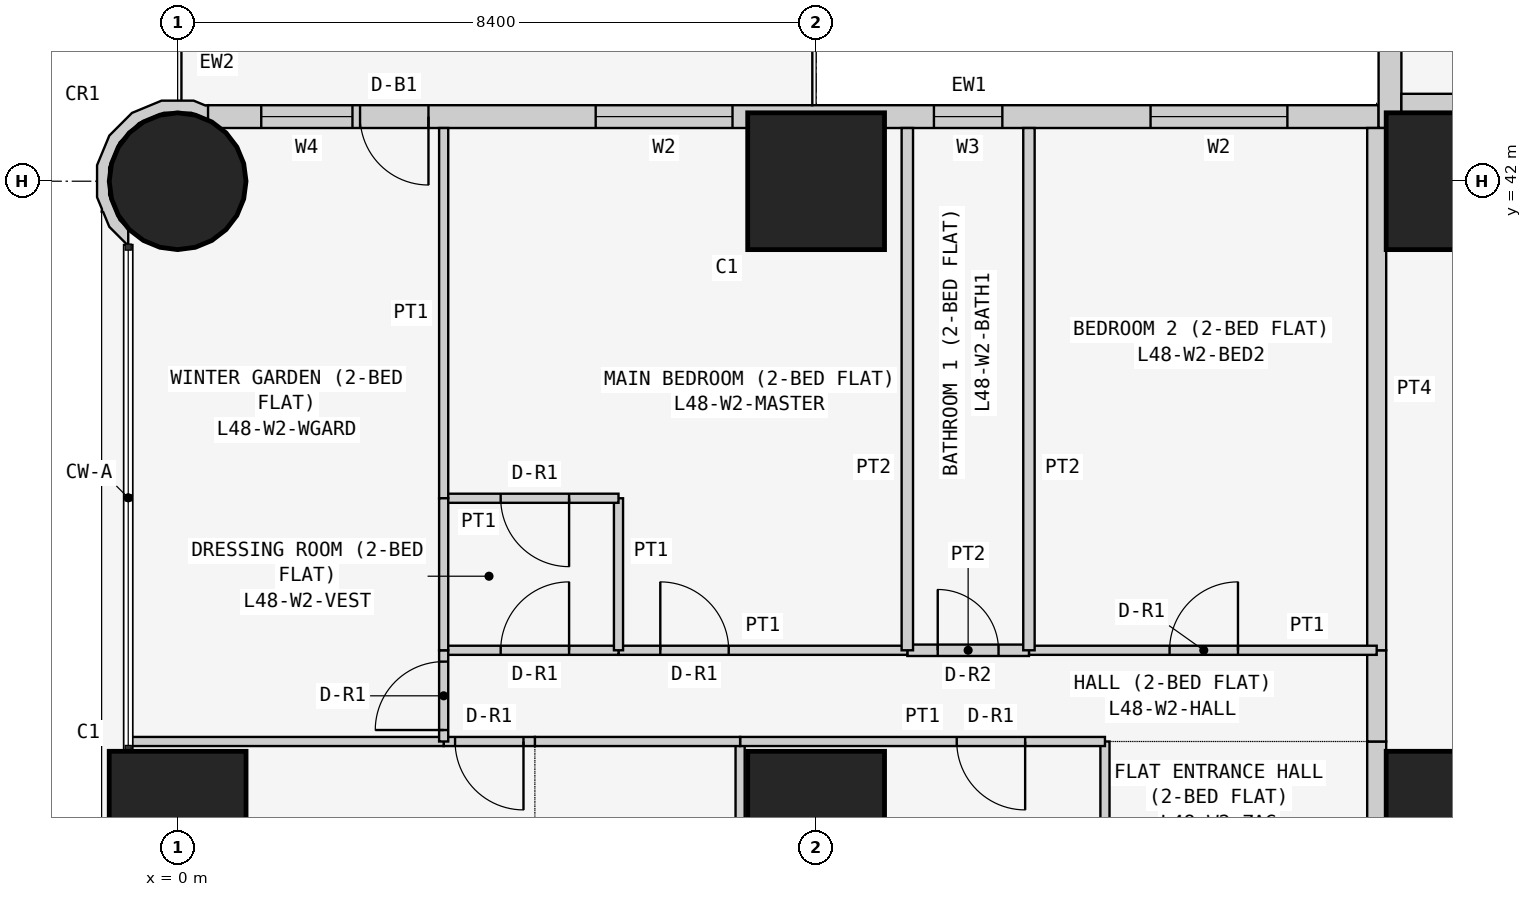
"""IFC4 building model, lengths in metres.
Left out: names, types, materials, properties, quantities, classifications, styles, units other than length and angle.
Written with IfcOpenShell. Run it as: python <this file> out.ifc"""

import sys

from ifc_helpers import new_model, si_unit, direction, frame, frame_2d, origin, origin_2d, place, context, subcontext, project, spatial, polyline, rectangle, circle, outline, extrude, element, fill, save


model = new_model("IFC4")
c1 = context("Model", 3, precision=1e-05, world=origin(), true_north=direction((0.0, 1.0)))
c2 = subcontext(c1, "Body", "Model", "MODEL_VIEW")
j1 = project(units=[si_unit("LENGTHUNIT", "METRE"), si_unit("PLANEANGLEUNIT", "RADIAN")], contexts=[c1])
p1 = place(None, origin())
s1 = spatial("IfcSite", under=j1, at=p1, CompositionType="ELEMENT")
p2 = place(p1, origin())
s2 = spatial("IfcBuilding", under=s1, at=p2, CompositionType="ELEMENT")
p3 = place(p2, frame((0.0, 0.0, 186.9)))
s3 = spatial("IfcBuildingStorey", under=s2, at=p3, CompositionType="ELEMENT", Elevation=186.9)
p4 = place(p3, frame((0.0, 33.6, 0.0), z_axis=(0.0, 0.0, 1.0), x_axis=(1.0, 0.0, 0.0)))
e1 = element("IfcColumn", 1, at=p4, inside=s3, PredefinedType="COLUMN", context=c2, shape_type="SweptSolid", body=[
    extrude(rectangle(XDim=1.8, YDim=1.8, at=origin_2d()), origin(), (0.0, 0.0, 1.0), 3.6),
])
p5 = place(p3, frame((0.0, 42.0, 0.0), z_axis=(0.0, 0.0, 1.0), x_axis=(1.0, 0.0, 0.0)))
e2 = element("IfcColumn", 2, at=p5, inside=s3, PredefinedType="COLUMN", context=c2, shape_type="SweptSolid", body=[
    extrude(circle(Radius=0.9, at=origin_2d()), origin(), (0.0, 0.0, 1.0), 3.6),
])
for number, where, z_axis, x_axis in (
    (3, (8.4, 33.6, 0.0), (0.0, 0.0, 1.0), (1.0, 0.0, 0.0)),
    (4, (8.4, 42.0, 0.0), (0.0, 0.0, 1.0), (1.0, 0.0, 0.0)),
    (5, (16.8, 33.6, 0.0), (0.0, 0.0, 1.0), (1.0, 0.0, 0.0)),
    (6, (16.8, 42.0, 0.0), (0.0, 0.0, 1.0), (1.0, 0.0, 0.0)),
):
    element("IfcColumn", number, at=place(p3, frame(where, z_axis=z_axis, x_axis=x_axis)), inside=s3, PredefinedType="COLUMN", context=c2, shape_type="SweptSolid", body=[
        extrude(rectangle(XDim=1.8, YDim=1.8, at=origin_2d()), origin(), (0.0, 0.0, 1.0), 3.6),
    ])
p6 = place(p3, frame((15.8, 42.85, 0.0), z_axis=(0.0, 0.0, 1.0), x_axis=(-1.0, 0.0, 0.0)))
e7 = element("IfcWall", 7, at=p6, inside=s3, PredefinedType="SOLIDWALL", context=c2, shape_type="SweptSolid", body=[
    extrude(rectangle(XDim=15.4, YDim=0.3, at=frame_2d((7.7, 0.0))), origin(), (0.0, 0.0, 1.0), 3.45),
])
p7 = place(p6, frame((1.2, 0.0, 0.9)))
e8 = element("IfcOpeningElement", 8, at=p7, cuts=e7, PredefinedType="OPENING", context=c2, shape_type="SweptSolid", body=[
    extrude(rectangle(XDim=1.8, YDim=1.5, at=frame_2d((0.9, 0.75))), frame((0.0, 0.16, 0.0), z_axis=(0.0, -1.0, 0.0), x_axis=(1.0, 0.0, 0.0)), (0.0, 0.0, 1.0), 0.32),
])
p8 = place(p6, frame((4.95, 0.0, 1.5)))
e9 = element("IfcOpeningElement", 9, at=p8, cuts=e7, PredefinedType="OPENING", context=c2, shape_type="SweptSolid", body=[
    extrude(rectangle(XDim=0.9, YDim=0.7, at=frame_2d((0.45, 0.35))), frame((0.0, 0.16, 0.0), z_axis=(0.0, -1.0, 0.0), x_axis=(1.0, 0.0, 0.0)), (0.0, 0.0, 1.0), 0.32),
])
p9 = place(p6, frame((8.5, 0.0, 0.9)))
e10 = element("IfcOpeningElement", 10, at=p9, cuts=e7, PredefinedType="OPENING", context=c2, shape_type="SweptSolid", body=[
    extrude(rectangle(XDim=1.8, YDim=1.5, at=frame_2d((0.9, 0.75))), frame((0.0, 0.16, 0.0), z_axis=(0.0, -1.0, 0.0), x_axis=(1.0, 0.0, 0.0)), (0.0, 0.0, 1.0), 0.32),
])
p10 = place(p6, frame((12.5, 0.0, 0.0)))
e11 = element("IfcOpeningElement", 11, at=p10, cuts=e7, PredefinedType="OPENING", context=c2, shape_type="SweptSolid", body=[
    extrude(rectangle(XDim=0.9, YDim=2.4, at=frame_2d((0.45, 1.2))), frame((0.0, 0.16, 0.0), z_axis=(0.0, -1.0, 0.0), x_axis=(1.0, 0.0, 0.0)), (0.0, 0.0, 1.0), 0.32),
])
p11 = place(p6, frame((13.5, 0.0, 0.9)))
e12 = element("IfcOpeningElement", 12, at=p11, cuts=e7, PredefinedType="OPENING", context=c2, shape_type="SweptSolid", body=[
    extrude(rectangle(XDim=1.2, YDim=1.5, at=frame_2d((0.6, 0.75))), frame((0.0, 0.16, 0.0), z_axis=(0.0, -1.0, 0.0), x_axis=(1.0, 0.0, 0.0)), (0.0, 0.0, 1.0), 0.32),
])
p12 = place(p3, frame((15.95, 50.0, 0.0), z_axis=(0.0, 0.0, 1.0), x_axis=(0.0, -1.0, 0.0)))
e13 = element("IfcWall", 13, at=p12, inside=s3, PredefinedType="SOLIDWALL", context=c2, shape_type="SweptSolid", body=[
    extrude(rectangle(XDim=7.3, YDim=0.3, at=frame_2d((3.65, 0.0))), origin(), (0.0, 0.0, 1.0), 3.45),
])
p13 = place(p12, frame((3.1, 0.0, 0.9)))
e14 = element("IfcOpeningElement", 14, at=p13, cuts=e13, PredefinedType="OPENING", context=c2, shape_type="SweptSolid", body=[
    extrude(rectangle(XDim=2.4, YDim=1.5, at=frame_2d((1.2, 0.75))), frame((0.0, 0.16, 0.0), z_axis=(0.0, -1.0, 0.0), x_axis=(1.0, 0.0, 0.0)), (0.0, 0.0, 1.0), 0.32),
])
p14 = place(p12, frame((0.75, 0.0, 0.9)))
e15 = element("IfcOpeningElement", 15, at=p14, cuts=e13, PredefinedType="OPENING", context=c2, shape_type="SweptSolid", body=[
    extrude(rectangle(XDim=1.2, YDim=1.5, at=frame_2d((0.6, 0.75))), frame((0.0, 0.16, 0.0), z_axis=(0.0, -1.0, 0.0), x_axis=(1.0, 0.0, 0.0)), (0.0, 0.0, 1.0), 0.32),
])
p15 = place(p3, frame((0.364, 42.91, 0.0), z_axis=(0.0, 0.0, 1.0), x_axis=(-0.926129809145, 0.377204953059, 0.0)))
e16 = element("IfcWall", 16, at=p15, inside=s3, PredefinedType="SOLIDWALL", context=c2, shape_type="SweptSolid", body=[
    extrude(outline(polyline([(0.36, 1.803), (0.509, 1.741), (0.761, 1.486), (0.896, 1.154), (0.894, 0.795), (0.755, 0.465), (0.5, 0.213), (0.168, 0.078), (-0.1, 0.08), (0.001, -0.097), (0.03, -0.08), (0.199, -0.081), (0.589, 0.078), (0.889, 0.374), (1.053, 0.763), (1.055, 1.185), (0.896, 1.575), (0.778, 1.695), (0.769, 1.728), (0.75, 1.723), (0.6, 1.875), (0.295, 2.003), (0.281, 1.998), (0.36, 1.803)])), origin(), (0.0, 0.0, 1.0), 3.45),
])
p16 = place(p3, frame((16.1, 43.025, 0.0), z_axis=(0.0, 0.0, 1.0), x_axis=(1.0, 0.0, 0.0)))
e17 = element("IfcWall", 17, at=p16, inside=s3, PredefinedType="PARTITIONING", context=c2, shape_type="SweptSolid", body=[
    extrude(rectangle(XDim=6.471, YDim=0.25, at=frame_2d((3.235, 0.0))), origin(), (0.0, 0.0, 1.0), 3.45),
])
p17 = place(p3, frame((15.775, 29.4, 0.0), z_axis=(0.0, 0.0, 1.0), x_axis=(0.0, 1.0, 0.0)))
e18 = element("IfcWall", 18, at=p17, inside=s3, PredefinedType="PARTITIONING", context=c2, shape_type="SweptSolid", body=[
    extrude(rectangle(XDim=5.229, YDim=0.25, at=frame_2d((2.615, 0.0))), origin(), (0.0, 0.0, 1.0), 3.45),
])
p18 = place(p17, frame((2.1, 0.0, 0.0)))
e19 = element("IfcOpeningElement", 19, at=p18, cuts=e18, PredefinedType="OPENING", context=c2, shape_type="SweptSolid", body=[
    extrude(rectangle(XDim=1.0, YDim=2.1, at=frame_2d((0.5, 1.05))), frame((0.0, 0.135, 0.0), z_axis=(0.0, -1.0, 0.0), x_axis=(1.0, 0.0, 0.0)), (0.0, 0.0, 1.0), 0.27),
])
p19 = place(p3, frame((15.775, 34.629, 0.0), z_axis=(0.0, 0.0, 1.0), x_axis=(0.0, 1.0, 0.0)))
e20 = element("IfcWall", 20, at=p19, inside=s3, PredefinedType="PARTITIONING", context=c2, shape_type="SweptSolid", body=[
    extrude(rectangle(XDim=1.2, YDim=0.25, at=frame_2d((0.6, 0.0))), origin(), (0.0, 0.0, 1.0), 3.45),
])
p20 = place(p3, frame((15.775, 35.829, 0.0), z_axis=(0.0, 0.0, 1.0), x_axis=(0.0, 1.0, 0.0)))
e21 = element("IfcWall", 21, at=p20, inside=s3, PredefinedType="PARTITIONING", context=c2, shape_type="SweptSolid", body=[
    extrude(rectangle(XDim=6.871, YDim=0.25, at=frame_2d((3.436, 0.0))), origin(), (0.0, 0.0, 1.0), 3.45),
])
for number, where, z_axis, x_axis in (
    (22, (12.2, 29.4, 0.0), (0.0, 0.0, 1.0), (0.0, 1.0, 0.0)),
    (23, (7.4, 29.4, 0.0), (0.0, 0.0, 1.0), (0.0, 1.0, 0.0)),
):
    element("IfcWall", number, at=place(p3, frame(where, z_axis=z_axis, x_axis=x_axis)), inside=s3, PredefinedType="PARTITIONING", context=c2, shape_type="SweptSolid", body=[
        extrude(rectangle(XDim=5.229, YDim=0.12, at=frame_2d((2.615, 0.0))), origin(), (0.0, 0.0, 1.0), 3.45),
    ])
p21 = place(p3, frame((7.4, 34.629, 0.0), z_axis=(0.0, 0.0, 1.0), x_axis=(1.0, 0.0, 0.0)))
e24 = element("IfcWall", 24, at=p21, inside=s3, PredefinedType="PARTITIONING", context=c2, shape_type="SweptSolid", body=[
    extrude(rectangle(XDim=4.8, YDim=0.12, at=frame_2d((2.4, 0.0))), origin(), (0.0, 0.0, 1.0), 3.45),
])
p22 = place(p21, frame((2.85, 0.0, 0.0)))
e25 = element("IfcOpeningElement", 25, at=p22, cuts=e24, PredefinedType="OPENING", context=c2, shape_type="SweptSolid", body=[
    extrude(rectangle(XDim=0.9, YDim=2.1, at=frame_2d((0.45, 1.05))), frame((0.0, 0.07, 0.0), z_axis=(0.0, -1.0, 0.0), x_axis=(1.0, 0.0, 0.0)), (0.0, 0.0, 1.0), 0.14),
])
p23 = place(p3, frame((4.7, 34.629, 0.0), z_axis=(0.0, 0.0, 1.0), x_axis=(1.0, 0.0, 0.0)))
e26 = element("IfcWall", 26, at=p23, inside=s3, PredefinedType="PARTITIONING", context=c2, shape_type="SweptSolid", body=[
    extrude(rectangle(XDim=2.7, YDim=0.12, at=frame_2d((1.35, 0.0))), origin(), (0.0, 0.0, 1.0), 3.45),
])
p24 = place(p3, frame((3.5, 34.629, 0.0), z_axis=(0.0, 0.0, 1.0), x_axis=(1.0, 0.0, 0.0)))
e27 = element("IfcWall", 27, at=p24, inside=s3, PredefinedType="PARTITIONING", context=c2, shape_type="SweptSolid", body=[
    extrude(rectangle(XDim=1.2, YDim=0.12, at=frame_2d((0.6, 0.0))), origin(), (0.0, 0.0, 1.0), 3.45),
])
p25 = place(p24, frame((0.15, 0.0, 0.0)))
e28 = element("IfcOpeningElement", 28, at=p25, cuts=e27, PredefinedType="OPENING", context=c2, shape_type="SweptSolid", body=[
    extrude(rectangle(XDim=0.9, YDim=2.1, at=frame_2d((0.45, 1.05))), frame((0.0, 0.07, 0.0), z_axis=(0.0, -1.0, 0.0), x_axis=(1.0, 0.0, 0.0)), (0.0, 0.0, 1.0), 0.14),
])
p26 = place(p3, frame((-0.65, 34.629, 0.0), z_axis=(0.0, 0.0, 1.0), x_axis=(1.0, 0.0, 0.0)))
e29 = element("IfcWall", 29, at=p26, inside=s3, PredefinedType="PARTITIONING", context=c2, shape_type="SweptSolid", body=[
    extrude(rectangle(XDim=4.15, YDim=0.12, at=frame_2d((2.075, 0.0))), origin(), (0.0, 0.0, 1.0), 3.45),
])
p27 = place(p3, frame((11.2, 35.829, 0.0), z_axis=(0.0, 0.0, 1.0), x_axis=(1.0, 0.0, 0.0)))
e30 = element("IfcWall", 30, at=p27, inside=s3, PredefinedType="PARTITIONING", context=c2, shape_type="SweptSolid", body=[
    extrude(rectangle(XDim=4.575, YDim=0.12, at=frame_2d((2.288, 0.0))), origin(), (0.0, 0.0, 1.0), 3.45),
])
p28 = place(p27, frame((1.85, 0.0, 0.0)))
e31 = element("IfcOpeningElement", 31, at=p28, cuts=e30, PredefinedType="OPENING", context=c2, shape_type="SweptSolid", body=[
    extrude(rectangle(XDim=0.9, YDim=2.1, at=frame_2d((0.45, 1.05))), frame((0.0, 0.07, 0.0), z_axis=(0.0, -1.0, 0.0), x_axis=(1.0, 0.0, 0.0)), (0.0, 0.0, 1.0), 0.14),
])
p29 = place(p3, frame((9.6, 35.829, 0.0), z_axis=(0.0, 0.0, 1.0), x_axis=(1.0, 0.0, 0.0)))
e32 = element("IfcWall", 32, at=p29, inside=s3, PredefinedType="PARTITIONING", context=c2, shape_type="SweptSolid", body=[
    extrude(rectangle(XDim=1.6, YDim=0.15, at=frame_2d((0.8, 0.0))), origin(), (0.0, 0.0, 1.0), 3.45),
])
p30 = place(p29, frame((0.4, 0.0, 0.0)))
e33 = element("IfcOpeningElement", 33, at=p30, cuts=e32, PredefinedType="OPENING", context=c2, shape_type="SweptSolid", body=[
    extrude(rectangle(XDim=0.8, YDim=2.1, at=frame_2d((0.4, 1.05))), frame((0.0, 0.085, 0.0), z_axis=(0.0, -1.0, 0.0), x_axis=(1.0, 0.0, 0.0)), (0.0, 0.0, 1.0), 0.17),
])
p31 = place(p3, frame((5.8, 35.829, 0.0), z_axis=(0.0, 0.0, 1.0), x_axis=(1.0, 0.0, 0.0)))
e34 = element("IfcWall", 34, at=p31, inside=s3, PredefinedType="PARTITIONING", context=c2, shape_type="SweptSolid", body=[
    extrude(rectangle(XDim=3.8, YDim=0.12, at=frame_2d((1.9, 0.0))), origin(), (0.0, 0.0, 1.0), 3.45),
])
p32 = place(p31, frame((0.55, 0.0, 0.0)))
e35 = element("IfcOpeningElement", 35, at=p32, cuts=e34, PredefinedType="OPENING", context=c2, shape_type="SweptSolid", body=[
    extrude(rectangle(XDim=0.9, YDim=2.1, at=frame_2d((0.45, 1.05))), frame((0.0, 0.07, 0.0), z_axis=(0.0, -1.0, 0.0), x_axis=(1.0, 0.0, 0.0)), (0.0, 0.0, 1.0), 0.14),
])
p33 = place(p3, frame((3.5, 35.829, 0.0), z_axis=(0.0, 0.0, 1.0), x_axis=(1.0, 0.0, 0.0)))
e36 = element("IfcWall", 36, at=p33, inside=s3, PredefinedType="PARTITIONING", context=c2, shape_type="SweptSolid", body=[
    extrude(rectangle(XDim=2.3, YDim=0.12, at=frame_2d((1.15, 0.0))), origin(), (0.0, 0.0, 1.0), 3.45),
])
p34 = place(p33, frame((0.75, 0.0, 0.0)))
e37 = element("IfcOpeningElement", 37, at=p34, cuts=e36, PredefinedType="OPENING", context=c2, shape_type="SweptSolid", body=[
    extrude(rectangle(XDim=0.9, YDim=2.1, at=frame_2d((0.45, 1.05))), frame((0.0, 0.07, 0.0), z_axis=(0.0, -1.0, 0.0), x_axis=(1.0, 0.0, 0.0)), (0.0, 0.0, 1.0), 0.14),
])
p35 = place(p3, frame((3.5, 34.629, 0.0), z_axis=(0.0, 0.0, 1.0), x_axis=(0.0, 1.0, 0.0)))
e38 = element("IfcWall", 38, at=p35, inside=s3, PredefinedType="PARTITIONING", context=c2, shape_type="SweptSolid", body=[
    extrude(rectangle(XDim=1.2, YDim=0.12, at=frame_2d((0.6, 0.0))), origin(), (0.0, 0.0, 1.0), 3.45),
])
p36 = place(p35, frame((0.151, 0.0, 0.0)))
e39 = element("IfcOpeningElement", 39, at=p36, cuts=e38, PredefinedType="OPENING", context=c2, shape_type="SweptSolid", body=[
    extrude(rectangle(XDim=0.9, YDim=2.1, at=frame_2d((0.45, 1.05))), frame((0.0, 0.07, 0.0), z_axis=(0.0, -1.0, 0.0), x_axis=(1.0, 0.0, 0.0)), (0.0, 0.0, 1.0), 0.14),
])
for number, where, z_axis, x_axis in (
    (40, (11.2, 35.829, 0.0), (0.0, 0.0, 1.0), (0.0, 1.0, 0.0)),
    (41, (9.6, 35.829, 0.0), (0.0, 0.0, 1.0), (0.0, 1.0, 0.0)),
):
    element("IfcWall", number, at=place(p3, frame(where, z_axis=z_axis, x_axis=x_axis)), inside=s3, PredefinedType="PARTITIONING", context=c2, shape_type="SweptSolid", body=[
        extrude(rectangle(XDim=6.871, YDim=0.15, at=frame_2d((3.436, 0.0))), origin(), (0.0, 0.0, 1.0), 3.45),
    ])
p37 = place(p3, frame((5.8, 35.829, 0.0), z_axis=(0.0, 0.0, 1.0), x_axis=(0.0, 1.0, 0.0)))
e42 = element("IfcWall", 42, at=p37, inside=s3, PredefinedType="PARTITIONING", context=c2, shape_type="SweptSolid", body=[
    extrude(rectangle(XDim=2.0, YDim=0.12, at=frame_2d((1.0, 0.0))), origin(), (0.0, 0.0, 1.0), 3.45),
])
p38 = place(p3, frame((5.8, 37.829, 0.0), z_axis=(0.0, 0.0, 1.0), x_axis=(-1.0, 0.0, 0.0)))
e43 = element("IfcWall", 43, at=p38, inside=s3, PredefinedType="PARTITIONING", context=c2, shape_type="SweptSolid", body=[
    extrude(rectangle(XDim=2.3, YDim=0.12, at=frame_2d((1.15, 0.0))), origin(), (0.0, 0.0, 1.0), 3.45),
])
p39 = place(p38, frame((0.65, 0.0, 0.0)))
e44 = element("IfcOpeningElement", 44, at=p39, cuts=e43, PredefinedType="OPENING", context=c2, shape_type="SweptSolid", body=[
    extrude(rectangle(XDim=0.9, YDim=2.1, at=frame_2d((0.45, 1.05))), frame((0.0, 0.07, 0.0), z_axis=(0.0, -1.0, 0.0), x_axis=(1.0, 0.0, 0.0)), (0.0, 0.0, 1.0), 0.14),
])
p40 = place(p3, frame((3.5, 37.829, 0.0), z_axis=(0.0, 0.0, 1.0), x_axis=(0.0, 1.0, 0.0)))
e45 = element("IfcWall", 45, at=p40, inside=s3, PredefinedType="PARTITIONING", context=c2, shape_type="SweptSolid", body=[
    extrude(rectangle(XDim=4.871, YDim=0.12, at=frame_2d((2.436, 0.0))), origin(), (0.0, 0.0, 1.0), 3.45),
])
p41 = place(p3, frame((3.5, 35.829, 0.0), z_axis=(0.0, 0.0, 1.0), x_axis=(0.0, 1.0, 0.0)))
e46 = element("IfcWall", 46, at=p41, inside=s3, PredefinedType="PARTITIONING", context=c2, shape_type="SweptSolid", body=[
    extrude(rectangle(XDim=2.0, YDim=0.12, at=frame_2d((1.0, 0.0))), origin(), (0.0, 0.0, 1.0), 3.45),
])
p42 = place(p7, origin())
e47 = element("IfcWindow", 47, at=p42, inside=s3, PartitioningType="SINGLE_PANEL", PredefinedType="WINDOW", context=c2, shape_type="SweptSolid", body=[
    extrude(rectangle(XDim=1.8, YDim=1.5, at=frame_2d((0.9, 0.75))), frame((0.0, 0.03, 0.0), z_axis=(0.0, -1.0, 0.0), x_axis=(1.0, 0.0, 0.0)), (0.0, 0.0, 1.0), 0.06),
])
fill(e8, e47)
p43 = place(p8, origin())
e48 = element("IfcWindow", 48, at=p43, inside=s3, PartitioningType="SINGLE_PANEL", PredefinedType="WINDOW", context=c2, shape_type="SweptSolid", body=[
    extrude(rectangle(XDim=0.9, YDim=0.7, at=frame_2d((0.45, 0.35))), frame((0.0, 0.03, 0.0), z_axis=(0.0, -1.0, 0.0), x_axis=(1.0, 0.0, 0.0)), (0.0, 0.0, 1.0), 0.06),
])
fill(e9, e48)
p44 = place(p9, origin())
e49 = element("IfcWindow", 49, at=p44, inside=s3, PartitioningType="SINGLE_PANEL", PredefinedType="WINDOW", context=c2, shape_type="SweptSolid", body=[
    extrude(rectangle(XDim=1.8, YDim=1.5, at=frame_2d((0.9, 0.75))), frame((0.0, 0.03, 0.0), z_axis=(0.0, -1.0, 0.0), x_axis=(1.0, 0.0, 0.0)), (0.0, 0.0, 1.0), 0.06),
])
fill(e10, e49)
p45 = place(p10, origin())
e50 = element("IfcDoor", 50, at=p45, inside=s3, OperationType="SINGLE_SWING_LEFT", PredefinedType="DOOR", context=c2, shape_type="SweptSolid", body=[
    extrude(rectangle(XDim=0.9, YDim=2.4, at=frame_2d((0.45, 1.2))), frame((0.0, 0.025, 0.0), z_axis=(0.0, -1.0, 0.0), x_axis=(1.0, 0.0, 0.0)), (0.0, 0.0, 1.0), 0.05),
])
fill(e11, e50)
p46 = place(p11, origin())
e51 = element("IfcWindow", 51, at=p46, inside=s3, PartitioningType="SINGLE_PANEL", PredefinedType="WINDOW", context=c2, shape_type="SweptSolid", body=[
    extrude(rectangle(XDim=1.2, YDim=1.5, at=frame_2d((0.6, 0.75))), frame((0.0, 0.03, 0.0), z_axis=(0.0, -1.0, 0.0), x_axis=(1.0, 0.0, 0.0)), (0.0, 0.0, 1.0), 0.06),
])
fill(e12, e51)
p47 = place(p22, frame((0.9, 0.0, 0.0), z_axis=(0.0, 0.0, 1.0), x_axis=(-1.0, 0.0, 0.0)))
e52 = element("IfcDoor", 52, at=p47, inside=s3, OperationType="SINGLE_SWING_LEFT", PredefinedType="DOOR", context=c2, shape_type="SweptSolid", body=[
    extrude(rectangle(XDim=0.9, YDim=2.1, at=frame_2d((0.45, 1.05))), frame((0.0, 0.025, 0.0), z_axis=(0.0, -1.0, 0.0), x_axis=(1.0, 0.0, 0.0)), (0.0, 0.0, 1.0), 0.05),
])
fill(e25, e52)
p48 = place(p25, frame((0.9, 0.0, 0.0), z_axis=(0.0, 0.0, 1.0), x_axis=(-1.0, 0.0, 0.0)))
e53 = element("IfcDoor", 53, at=p48, inside=s3, OperationType="SINGLE_SWING_LEFT", PredefinedType="DOOR", context=c2, shape_type="SweptSolid", body=[
    extrude(rectangle(XDim=0.9, YDim=2.1, at=frame_2d((0.45, 1.05))), frame((0.0, 0.025, 0.0), z_axis=(0.0, -1.0, 0.0), x_axis=(1.0, 0.0, 0.0)), (0.0, 0.0, 1.0), 0.05),
])
fill(e28, e53)
p49 = place(p28, origin())
e54 = element("IfcDoor", 54, at=p49, inside=s3, OperationType="SINGLE_SWING_RIGHT", PredefinedType="DOOR", context=c2, shape_type="SweptSolid", body=[
    extrude(rectangle(XDim=0.9, YDim=2.1, at=frame_2d((0.45, 1.05))), frame((0.0, 0.025, 0.0), z_axis=(0.0, -1.0, 0.0), x_axis=(1.0, 0.0, 0.0)), (0.0, 0.0, 1.0), 0.05),
])
fill(e31, e54)
p50 = place(p30, origin())
e55 = element("IfcDoor", 55, at=p50, inside=s3, OperationType="SINGLE_SWING_LEFT", PredefinedType="DOOR", context=c2, shape_type="SweptSolid", body=[
    extrude(rectangle(XDim=0.8, YDim=2.1, at=frame_2d((0.4, 1.05))), frame((0.0, 0.025, 0.0), z_axis=(0.0, -1.0, 0.0), x_axis=(1.0, 0.0, 0.0)), (0.0, 0.0, 1.0), 0.05),
])
fill(e33, e55)
p51 = place(p32, origin())
e56 = element("IfcDoor", 56, at=p51, inside=s3, OperationType="SINGLE_SWING_LEFT", PredefinedType="DOOR", context=c2, shape_type="SweptSolid", body=[
    extrude(rectangle(XDim=0.9, YDim=2.1, at=frame_2d((0.45, 1.05))), frame((0.0, 0.025, 0.0), z_axis=(0.0, -1.0, 0.0), x_axis=(1.0, 0.0, 0.0)), (0.0, 0.0, 1.0), 0.05),
])
fill(e35, e56)
p52 = place(p34, origin())
e57 = element("IfcDoor", 57, at=p52, inside=s3, OperationType="SINGLE_SWING_RIGHT", PredefinedType="DOOR", context=c2, shape_type="SweptSolid", body=[
    extrude(rectangle(XDim=0.9, YDim=2.1, at=frame_2d((0.45, 1.05))), frame((0.0, 0.025, 0.0), z_axis=(0.0, -1.0, 0.0), x_axis=(1.0, 0.0, 0.0)), (0.0, 0.0, 1.0), 0.05),
])
fill(e37, e57)
p53 = place(p39, origin())
e58 = element("IfcDoor", 58, at=p53, inside=s3, OperationType="SINGLE_SWING_LEFT", PredefinedType="DOOR", context=c2, shape_type="SweptSolid", body=[
    extrude(rectangle(XDim=0.9, YDim=2.1, at=frame_2d((0.45, 1.05))), frame((0.0, 0.025, 0.0), z_axis=(0.0, -1.0, 0.0), x_axis=(1.0, 0.0, 0.0)), (0.0, 0.0, 1.0), 0.05),
])
fill(e44, e58)
p54 = place(p36, origin())
e59 = element("IfcDoor", 59, at=p54, inside=s3, OperationType="SINGLE_SWING_LEFT", PredefinedType="DOOR", context=c2, shape_type="SweptSolid", body=[
    extrude(rectangle(XDim=0.9, YDim=2.1, at=frame_2d((0.45, 1.05))), frame((0.0, 0.025, 0.0), z_axis=(0.0, -1.0, 0.0), x_axis=(1.0, 0.0, 0.0)), (0.0, 0.0, 1.0), 0.05),
])
fill(e39, e59)
save(model, sys.argv[1])
